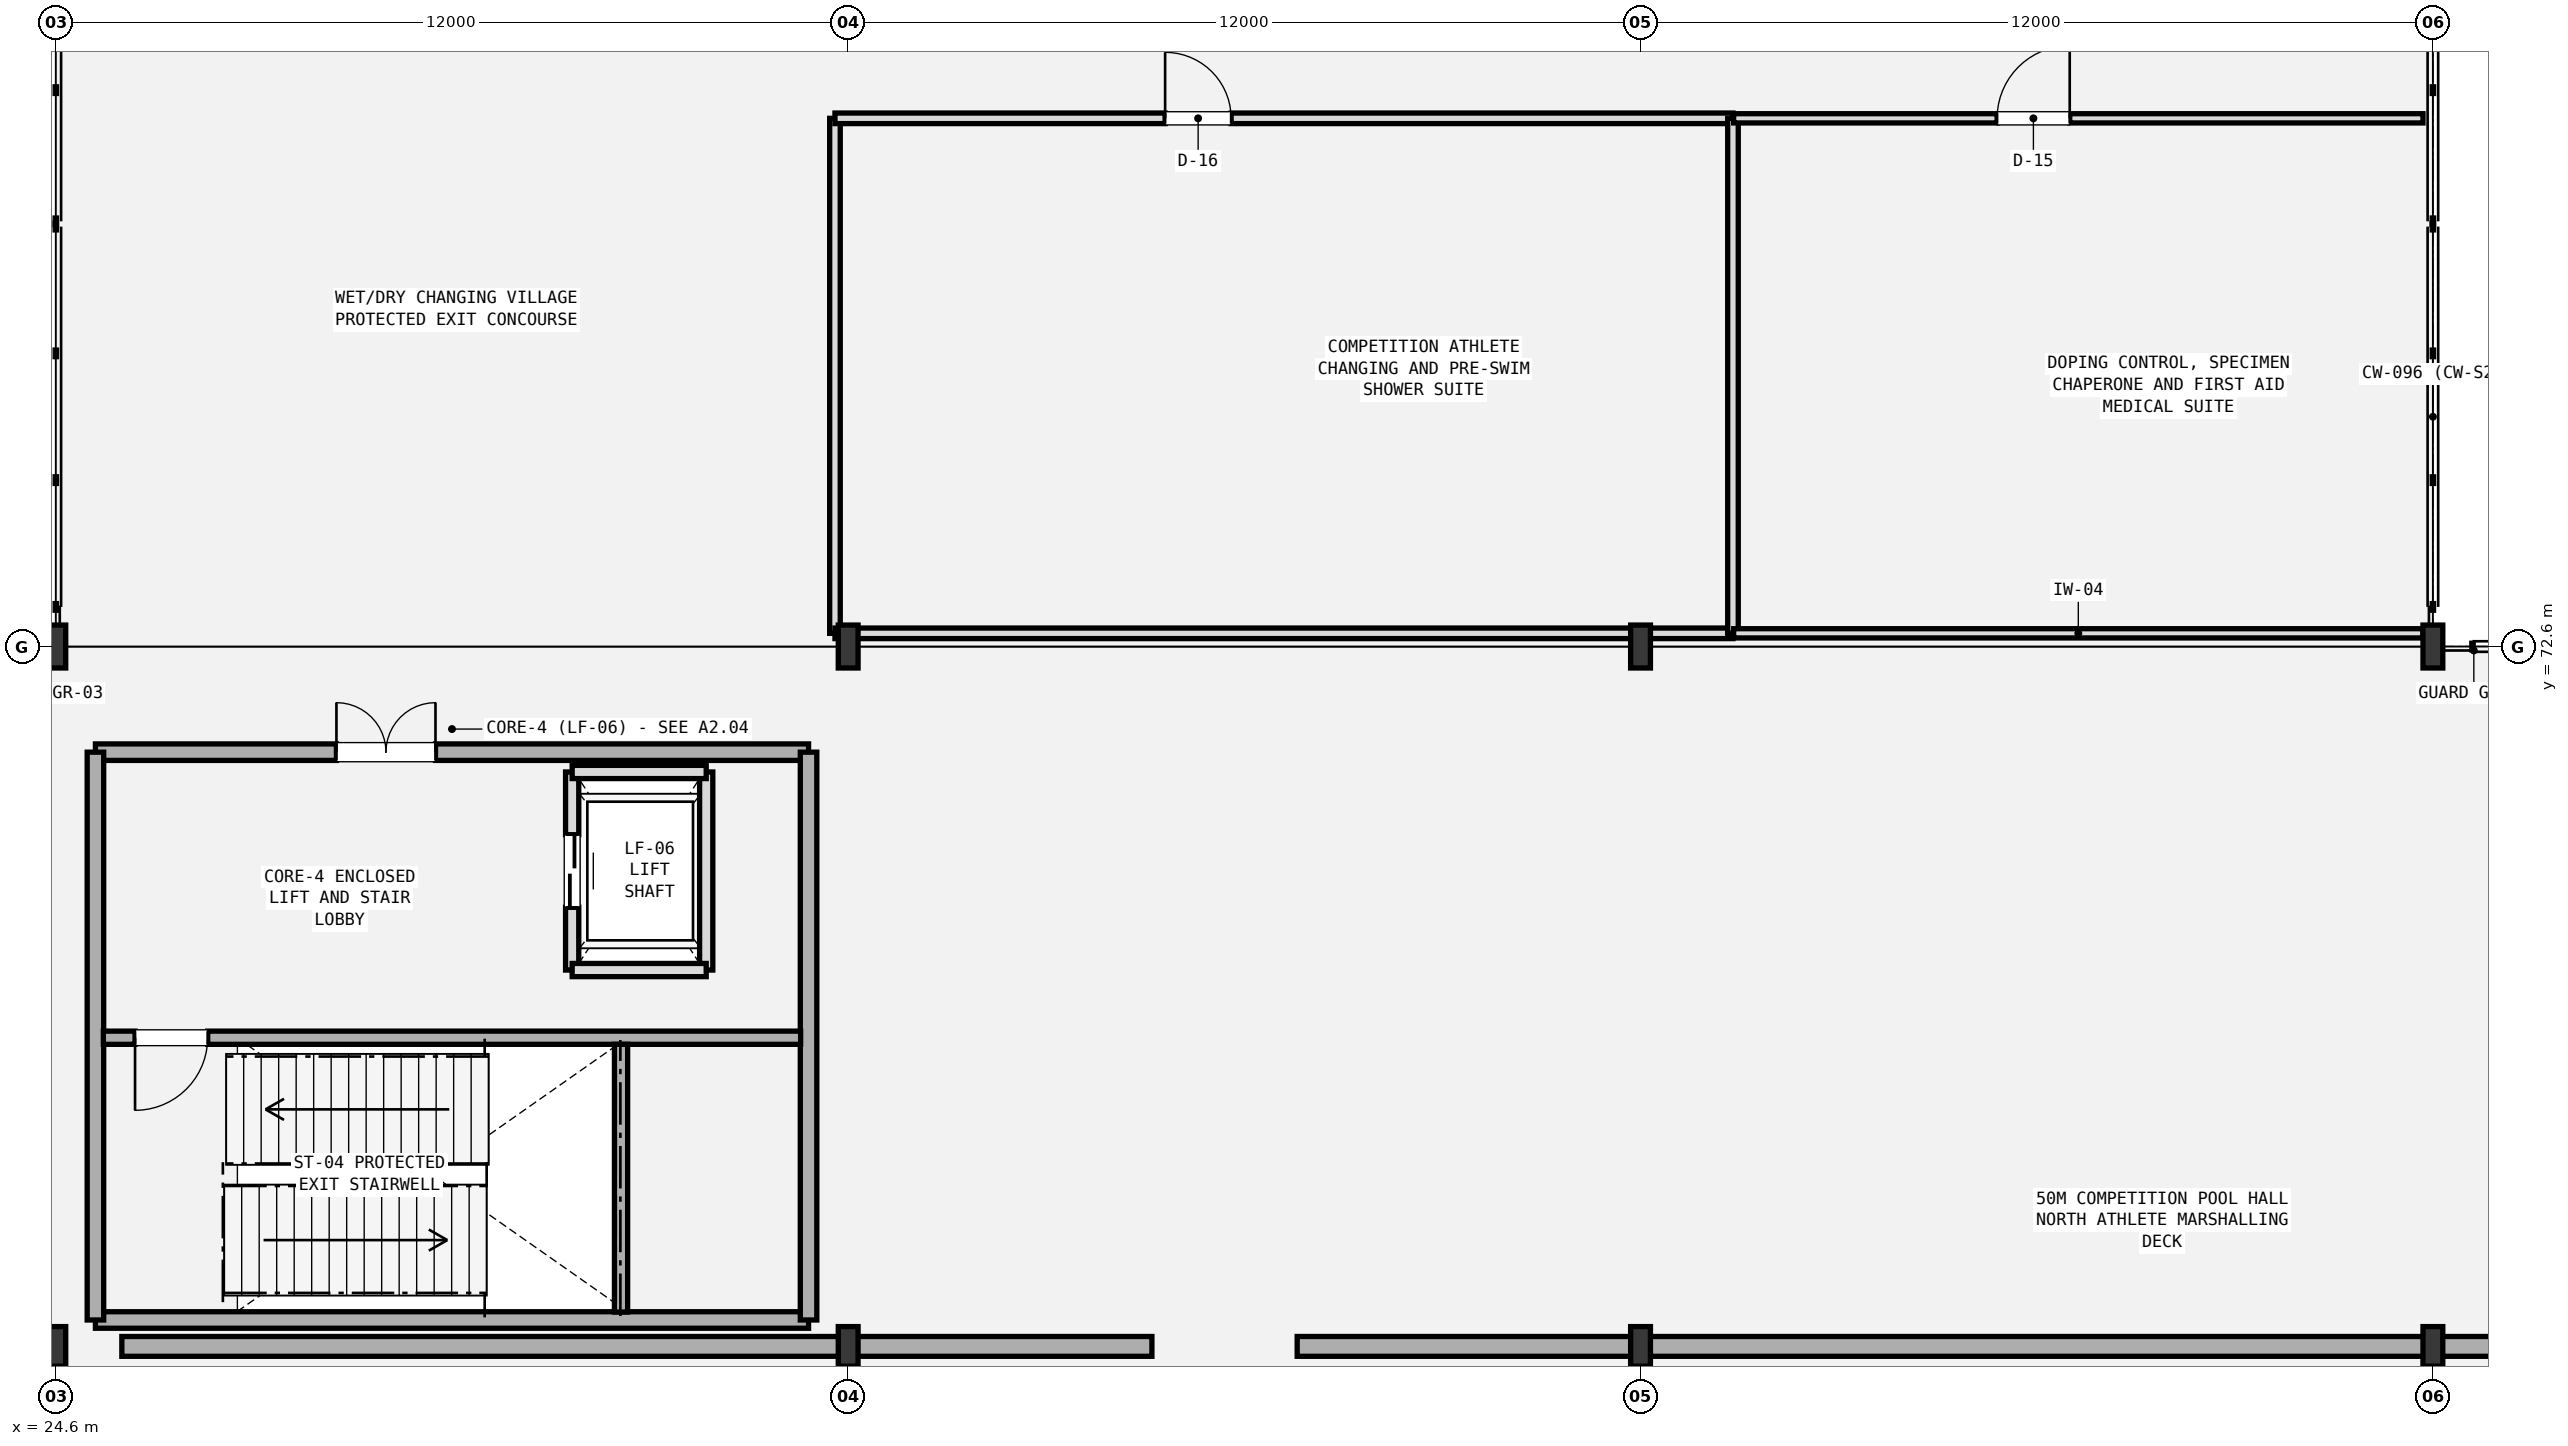
"""IFC4 building model, lengths in metres.
Left out: names, types, materials, properties, quantities, classifications, styles, units other than length and angle.
Written with IfcOpenShell. Run it as: python <this file> out.ifc"""

import sys

from ifc_helpers import new_model, si_unit, direction, frame, frame_2d, origin, origin_2d, place, context, subcontext, project, spatial, rectangle, i_section, extrude, element, fill, save


model = new_model("IFC4")
c1 = context("Model", 3, precision=1e-05, world=origin(), true_north=direction((0.0, 1.0)))
c2 = subcontext(c1, "Body", "Model", "MODEL_VIEW")
j1 = project(units=[si_unit("LENGTHUNIT", "METRE"), si_unit("PLANEANGLEUNIT", "RADIAN")], contexts=[c1])
p1 = place(None, origin())
s1 = spatial("IfcSite", under=j1, at=p1, CompositionType="ELEMENT")
p2 = place(p1, origin())
s2 = spatial("IfcBuilding", under=s1, at=p2, CompositionType="ELEMENT")
p3 = place(p2, origin())
s3 = spatial("IfcBuildingStorey", under=s2, at=p3, CompositionType="ELEMENT", Elevation=0.0)
p4 = place(p3, frame((24.6, 62.0, 0.0), z_axis=(0.0, 0.0, 1.0), x_axis=(1.0, 0.0, 0.0)))
e1 = element("IfcColumn", 1, at=p4, inside=s3, PredefinedType="COLUMN", context=c2, shape_type="SweptSolid", body=[
    extrude(i_section(OverallWidth=0.3, OverallDepth=0.6, WebThickness=0.015, FlangeThickness=0.03, FilletRadius=0.027, at=origin_2d()), origin(), (0.0, 0.0, 1.0), 5.4),
])
p5 = place(p3, frame((24.6, 72.6, 0.0), z_axis=(0.0, 0.0, 1.0), x_axis=(1.0, 0.0, 0.0)))
e2 = element("IfcColumn", 2, at=p5, inside=s3, PredefinedType="COLUMN", context=c2, shape_type="SweptSolid", body=[
    extrude(i_section(OverallWidth=0.3, OverallDepth=0.65, WebThickness=0.016, FlangeThickness=0.031, FilletRadius=0.027, at=origin_2d()), origin(), (0.0, 0.0, 1.0), 5.4),
])
p6 = place(p3, frame((36.6, 62.0, 0.0), z_axis=(0.0, 0.0, 1.0), x_axis=(1.0, 0.0, 0.0)))
e3 = element("IfcColumn", 3, at=p6, inside=s3, PredefinedType="COLUMN", context=c2, shape_type="SweptSolid", body=[
    extrude(i_section(OverallWidth=0.3, OverallDepth=0.6, WebThickness=0.015, FlangeThickness=0.03, FilletRadius=0.027, at=origin_2d()), origin(), (0.0, 0.0, 1.0), 5.4),
])
p7 = place(p3, frame((36.6, 72.6, 0.0), z_axis=(0.0, 0.0, 1.0), x_axis=(1.0, 0.0, 0.0)))
e4 = element("IfcColumn", 4, at=p7, inside=s3, PredefinedType="COLUMN", context=c2, shape_type="SweptSolid", body=[
    extrude(i_section(OverallWidth=0.3, OverallDepth=0.65, WebThickness=0.016, FlangeThickness=0.031, FilletRadius=0.027, at=origin_2d()), origin(), (0.0, 0.0, 1.0), 5.4),
])
p8 = place(p3, frame((48.6, 62.0, 0.0), z_axis=(0.0, 0.0, 1.0), x_axis=(1.0, 0.0, 0.0)))
e5 = element("IfcColumn", 5, at=p8, inside=s3, PredefinedType="COLUMN", context=c2, shape_type="SweptSolid", body=[
    extrude(i_section(OverallWidth=0.3, OverallDepth=0.6, WebThickness=0.015, FlangeThickness=0.03, FilletRadius=0.027, at=origin_2d()), origin(), (0.0, 0.0, 1.0), 5.4),
])
p9 = place(p3, frame((48.6, 72.6, 0.0), z_axis=(0.0, 0.0, 1.0), x_axis=(1.0, 0.0, 0.0)))
e6 = element("IfcColumn", 6, at=p9, inside=s3, PredefinedType="COLUMN", context=c2, shape_type="SweptSolid", body=[
    extrude(i_section(OverallWidth=0.3, OverallDepth=0.65, WebThickness=0.016, FlangeThickness=0.031, FilletRadius=0.027, at=origin_2d()), origin(), (0.0, 0.0, 1.0), 5.4),
])
p10 = place(p3, frame((60.6, 62.0, 0.0), z_axis=(0.0, 0.0, 1.0), x_axis=(1.0, 0.0, 0.0)))
e7 = element("IfcColumn", 7, at=p10, inside=s3, PredefinedType="COLUMN", context=c2, shape_type="SweptSolid", body=[
    extrude(i_section(OverallWidth=0.3, OverallDepth=0.6, WebThickness=0.015, FlangeThickness=0.03, FilletRadius=0.027, at=origin_2d()), origin(), (0.0, 0.0, 1.0), 5.4),
])
p11 = place(p3, frame((60.6, 72.6, 0.0), z_axis=(0.0, 0.0, 1.0), x_axis=(1.0, 0.0, 0.0)))
e8 = element("IfcColumn", 8, at=p11, inside=s3, PredefinedType="COLUMN", context=c2, shape_type="SweptSolid", body=[
    extrude(i_section(OverallWidth=0.3, OverallDepth=0.65, WebThickness=0.016, FlangeThickness=0.031, FilletRadius=0.027, at=origin_2d()), origin(), (0.0, 0.0, 1.0), 5.4),
])
p12 = place(p3, frame((25.6, 62.0, 0.0), z_axis=(0.0, 0.0, 1.0), x_axis=(1.0, 0.0, 0.0)))
e9 = element("IfcWall", 9, at=p12, inside=s3, PredefinedType="SHEAR", context=c2, shape_type="SweptSolid", body=[
    extrude(rectangle(XDim=15.6, YDim=0.3, at=frame_2d((7.8, 0.0))), origin(), (0.0, 0.0, 1.0), 4.9),
])
p13 = place(p3, frame((43.4, 62.0, 0.0), z_axis=(0.0, 0.0, 1.0), x_axis=(1.0, 0.0, 0.0)))
e10 = element("IfcWall", 10, at=p13, inside=s3, PredefinedType="SHEAR", context=c2, shape_type="SweptSolid", body=[
    extrude(rectangle(XDim=22.4, YDim=0.3, at=frame_2d((11.2, 0.0))), origin(), (0.0, 0.0, 1.0), 4.9),
])
p14 = place(p3, frame((25.2, 62.4, 0.0), z_axis=(0.0, 0.0, 1.0), x_axis=(1.0, 0.0, 0.0)))
e11 = element("IfcWall", 11, at=p14, inside=s3, PredefinedType="SHEAR", context=c2, shape_type="SweptSolid", body=[
    extrude(rectangle(XDim=10.8, YDim=0.25, at=frame_2d((5.4, 0.0))), origin(), (0.0, 0.0, 1.0), 5.0),
])
p15 = place(p3, frame((25.2, 71.0, 0.0), z_axis=(0.0, 0.0, 1.0), x_axis=(1.0, 0.0, 0.0)))
e12 = element("IfcWall", 12, at=p15, inside=s3, PredefinedType="SHEAR", context=c2, shape_type="SweptSolid", body=[
    extrude(rectangle(XDim=10.8, YDim=0.25, at=frame_2d((5.4, 0.0))), origin(), (0.0, 0.0, 1.0), 5.0),
])
p16 = place(p15, frame((3.65, 0.0, 0.0)))
e13 = element("IfcOpeningElement", 13, at=p16, cuts=e12, PredefinedType="OPENING", context=c2, shape_type="SweptSolid", body=[
    extrude(rectangle(XDim=1.5, YDim=2.2, at=frame_2d((0.75, 1.1))), frame((0.0, 0.135, 0.0), z_axis=(0.0, -1.0, 0.0), x_axis=(1.0, 0.0, 0.0)), (0.0, 0.0, 1.0), 0.27),
])
for number, where, z_axis, x_axis in (
    (14, (25.2, 62.4, 0.0), (0.0, 0.0, 1.0), (0.0, 1.0, 0.0)),
    (15, (36.0, 62.4, 0.0), (0.0, 0.0, 1.0), (0.0, 1.0, 0.0)),
):
    element("IfcWall", number, at=place(p3, frame(where, z_axis=z_axis, x_axis=x_axis)), inside=s3, PredefinedType="SHEAR", context=c2, shape_type="SweptSolid", body=[
        extrude(rectangle(XDim=8.6, YDim=0.25, at=frame_2d((4.3, 0.0))), origin(), (0.0, 0.0, 1.0), 5.0),
    ])
p17 = place(p3, frame((25.32, 66.675, 0.0), z_axis=(0.0, 0.0, 1.0), x_axis=(1.0, 0.0, 0.0)))
e16 = element("IfcWall", 16, at=p17, inside=s3, PredefinedType="SHEAR", context=c2, shape_type="SweptSolid", body=[
    extrude(rectangle(XDim=10.56, YDim=0.2, at=frame_2d((5.28, 0.0))), origin(), (0.0, 0.0, 1.0), 5.0),
])
p18 = place(p17, frame((0.48, 0.0, 0.0)))
e17 = element("IfcOpeningElement", 17, at=p18, cuts=e16, PredefinedType="OPENING", context=c2, shape_type="SweptSolid", body=[
    extrude(rectangle(XDim=1.1, YDim=2.2, at=frame_2d((0.55, 1.1))), frame((0.0, 0.11, 0.0), z_axis=(0.0, -1.0, 0.0), x_axis=(1.0, 0.0, 0.0)), (0.0, 0.0, 1.0), 0.22),
])
p19 = place(p3, frame((33.16, 62.52, 0.0), z_axis=(0.0, 0.0, 1.0), x_axis=(0.0, 1.0, 0.0)))
e18 = element("IfcWall", 18, at=p19, inside=s3, PredefinedType="SHEAR", context=c2, shape_type="SweptSolid", body=[
    extrude(rectangle(XDim=4.055, YDim=0.2, at=frame_2d((2.027, 0.0))), origin(), (0.0, 0.0, 1.0), 5.0),
])
p20 = place(p3, frame((32.42, 67.7, 0.0), z_axis=(0.0, 0.0, 1.0), x_axis=(0.0, 1.0, 0.0)))
e19 = element("IfcWall", 19, at=p20, inside=s3, PredefinedType="SOLIDWALL", context=c2, shape_type="SweptSolid", body=[
    extrude(rectangle(XDim=3.0, YDim=0.2, at=frame_2d((1.5, 0.0))), origin(), (0.0, 0.0, 1.0), 5.0),
])
p21 = place(p20, frame((0.95, 0.0, 0.0)))
e20 = element("IfcOpeningElement", 20, at=p21, cuts=e19, PredefinedType="OPENING", context=c2, shape_type="SweptSolid", body=[
    extrude(rectangle(XDim=1.1, YDim=2.2, at=frame_2d((0.55, 1.1))), frame((0.0, 0.11, 0.0), z_axis=(0.0, -1.0, 0.0), x_axis=(1.0, 0.0, 0.0)), (0.0, 0.0, 1.0), 0.22),
])
p22 = place(p3, frame((34.45, 67.7, 0.0), z_axis=(0.0, 0.0, 1.0), x_axis=(0.0, 1.0, 0.0)))
e21 = element("IfcWall", 21, at=p22, inside=s3, PredefinedType="SOLIDWALL", context=c2, shape_type="SweptSolid", body=[
    extrude(rectangle(XDim=3.0, YDim=0.2, at=frame_2d((1.5, 0.0))), origin(), (0.0, 0.0, 1.0), 5.0),
])
for number, where, z_axis, x_axis in (
    (22, (32.42, 67.7, 0.0), (0.0, 0.0, 1.0), (1.0, 0.0, 0.0)),
    (23, (32.42, 70.7, 0.0), (0.0, 0.0, 1.0), (1.0, 0.0, 0.0)),
):
    element("IfcWall", number, at=place(p3, frame(where, z_axis=z_axis, x_axis=x_axis)), inside=s3, PredefinedType="SOLIDWALL", context=c2, shape_type="SweptSolid", body=[
        extrude(rectangle(XDim=2.03, YDim=0.2, at=frame_2d((1.015, 0.0))), origin(), (0.0, 0.0, 1.0), 5.0),
    ])
p23 = place(p3, frame((36.4, 72.8, 0.0), z_axis=(0.0, 0.0, 1.0), x_axis=(0.0, 1.0, 0.0)))
e24 = element("IfcWall", 24, at=p23, inside=s3, PredefinedType="PLUMBINGWALL", context=c2, shape_type="SweptSolid", body=[
    extrude(rectangle(XDim=7.8, YDim=0.16, at=frame_2d((3.9, 0.0))), origin(), (0.0, 0.0, 1.0), 3.9),
])
p24 = place(p3, frame((36.4, 72.8, 0.0), z_axis=(0.0, 0.0, 1.0), x_axis=(1.0, 0.0, 0.0)))
e25 = element("IfcWall", 25, at=p24, inside=s3, PredefinedType="PLUMBINGWALL", context=c2, shape_type="SweptSolid", body=[
    extrude(rectangle(XDim=13.6, YDim=0.16, at=frame_2d((6.8, 0.0))), origin(), (0.0, 0.0, 1.0), 3.9),
])
p25 = place(p3, frame((36.4, 80.6, 0.0), z_axis=(0.0, 0.0, 1.0), x_axis=(1.0, 0.0, 0.0)))
e26 = element("IfcWall", 26, at=p25, inside=s3, PredefinedType="PLUMBINGWALL", context=c2, shape_type="SweptSolid", body=[
    extrude(rectangle(XDim=13.6, YDim=0.16, at=frame_2d((6.8, 0.0))), origin(), (0.0, 0.0, 1.0), 3.9),
])
p26 = place(p25, frame((5.0, 0.0, 0.0)))
e27 = element("IfcOpeningElement", 27, at=p26, cuts=e26, PredefinedType="OPENING", context=c2, shape_type="SweptSolid", body=[
    extrude(rectangle(XDim=1.0, YDim=2.2, at=frame_2d((0.5, 1.1))), frame((0.0, 0.09, 0.0), z_axis=(0.0, -1.0, 0.0), x_axis=(1.0, 0.0, 0.0)), (0.0, 0.0, 1.0), 0.18),
])
p27 = place(p3, frame((50.0, 72.8, 0.0), z_axis=(0.0, 0.0, 1.0), x_axis=(0.0, 1.0, 0.0)))
e28 = element("IfcWall", 28, at=p27, inside=s3, PredefinedType="PLUMBINGWALL", context=c2, shape_type="SweptSolid", body=[
    extrude(rectangle(XDim=7.8, YDim=0.16, at=frame_2d((3.9, 0.0))), origin(), (0.0, 0.0, 1.0), 3.9),
])
p28 = place(p3, frame((50.01, 72.8, 0.0), z_axis=(0.0, 0.0, 1.0), x_axis=(1.0, 0.0, 0.0)))
e29 = element("IfcWall", 29, at=p28, inside=s3, PredefinedType="PARTITIONING", context=c2, shape_type="SweptSolid", body=[
    extrude(rectangle(XDim=10.44, YDim=0.14, at=frame_2d((5.22, 0.0))), origin(), (0.0, 0.0, 1.0), 3.9),
])
p29 = place(p3, frame((50.01, 80.6, 0.0), z_axis=(0.0, 0.0, 1.0), x_axis=(1.0, 0.0, 0.0)))
e30 = element("IfcWall", 30, at=p29, inside=s3, PredefinedType="PARTITIONING", context=c2, shape_type="SweptSolid", body=[
    extrude(rectangle(XDim=10.44, YDim=0.14, at=frame_2d((5.22, 0.0))), origin(), (0.0, 0.0, 1.0), 3.9),
])
p30 = place(p29, frame((3.99, 0.0, 0.0)))
e31 = element("IfcOpeningElement", 31, at=p30, cuts=e30, PredefinedType="OPENING", context=c2, shape_type="SweptSolid", body=[
    extrude(rectangle(XDim=1.1, YDim=2.2, at=frame_2d((0.55, 1.1))), frame((0.0, 0.08, 0.0), z_axis=(0.0, -1.0, 0.0), x_axis=(1.0, 0.0, 0.0)), (0.0, 0.0, 1.0), 0.16),
])
p31 = place(p16, origin())
e32 = element("IfcDoor", 32, at=p31, inside=s3, OperationType="DOUBLE_DOOR_SINGLE_SWING", PredefinedType="DOOR", context=c2, shape_type="SweptSolid", body=[
    extrude(rectangle(XDim=1.5, YDim=2.2, at=frame_2d((0.75, 1.1))), frame((0.0, 0.025, 0.0), z_axis=(0.0, -1.0, 0.0), x_axis=(1.0, 0.0, 0.0)), (0.0, 0.0, 1.0), 0.05),
])
fill(e13, e32)
p32 = place(p18, frame((1.1, 0.0, 0.0), z_axis=(0.0, 0.0, 1.0), x_axis=(-1.0, 0.0, 0.0)))
e33 = element("IfcDoor", 33, at=p32, inside=s3, OperationType="SINGLE_SWING_RIGHT", PredefinedType="DOOR", context=c2, shape_type="SweptSolid", body=[
    extrude(rectangle(XDim=1.1, YDim=2.2, at=frame_2d((0.55, 1.1))), frame((0.0, 0.025, 0.0), z_axis=(0.0, -1.0, 0.0), x_axis=(1.0, 0.0, 0.0)), (0.0, 0.0, 1.0), 0.05),
])
fill(e17, e33)
p33 = place(p21, origin())
e34 = element("IfcDoor", 34, at=p33, inside=s3, OperationType="DOUBLE_DOOR_SLIDING", PredefinedType="DOOR", context=c2, shape_type="SweptSolid", body=[
    extrude(rectangle(XDim=1.1, YDim=2.2, at=frame_2d((0.55, 1.1))), frame((0.0, 0.025, 0.0), z_axis=(0.0, -1.0, 0.0), x_axis=(1.0, 0.0, 0.0)), (0.0, 0.0, 1.0), 0.05),
])
fill(e20, e34)
p34 = place(p26, origin())
e35 = element("IfcDoor", 35, at=p34, inside=s3, OperationType="SINGLE_SWING_LEFT", PredefinedType="DOOR", context=c2, shape_type="SweptSolid", body=[
    extrude(rectangle(XDim=1.0, YDim=2.2, at=frame_2d((0.5, 1.1))), frame((0.0, 0.025, 0.0), z_axis=(0.0, -1.0, 0.0), x_axis=(1.0, 0.0, 0.0)), (0.0, 0.0, 1.0), 0.05),
])
fill(e27, e35)
p35 = place(p30, origin())
e36 = element("IfcDoor", 36, at=p35, inside=s3, OperationType="SINGLE_SWING_RIGHT", PredefinedType="DOOR", context=c2, shape_type="SweptSolid", body=[
    extrude(rectangle(XDim=1.1, YDim=2.2, at=frame_2d((0.55, 1.1))), frame((0.0, 0.025, 0.0), z_axis=(0.0, -1.0, 0.0), x_axis=(1.0, 0.0, 0.0)), (0.0, 0.0, 1.0), 0.05),
])
fill(e31, e36)
save(model, sys.argv[1])
